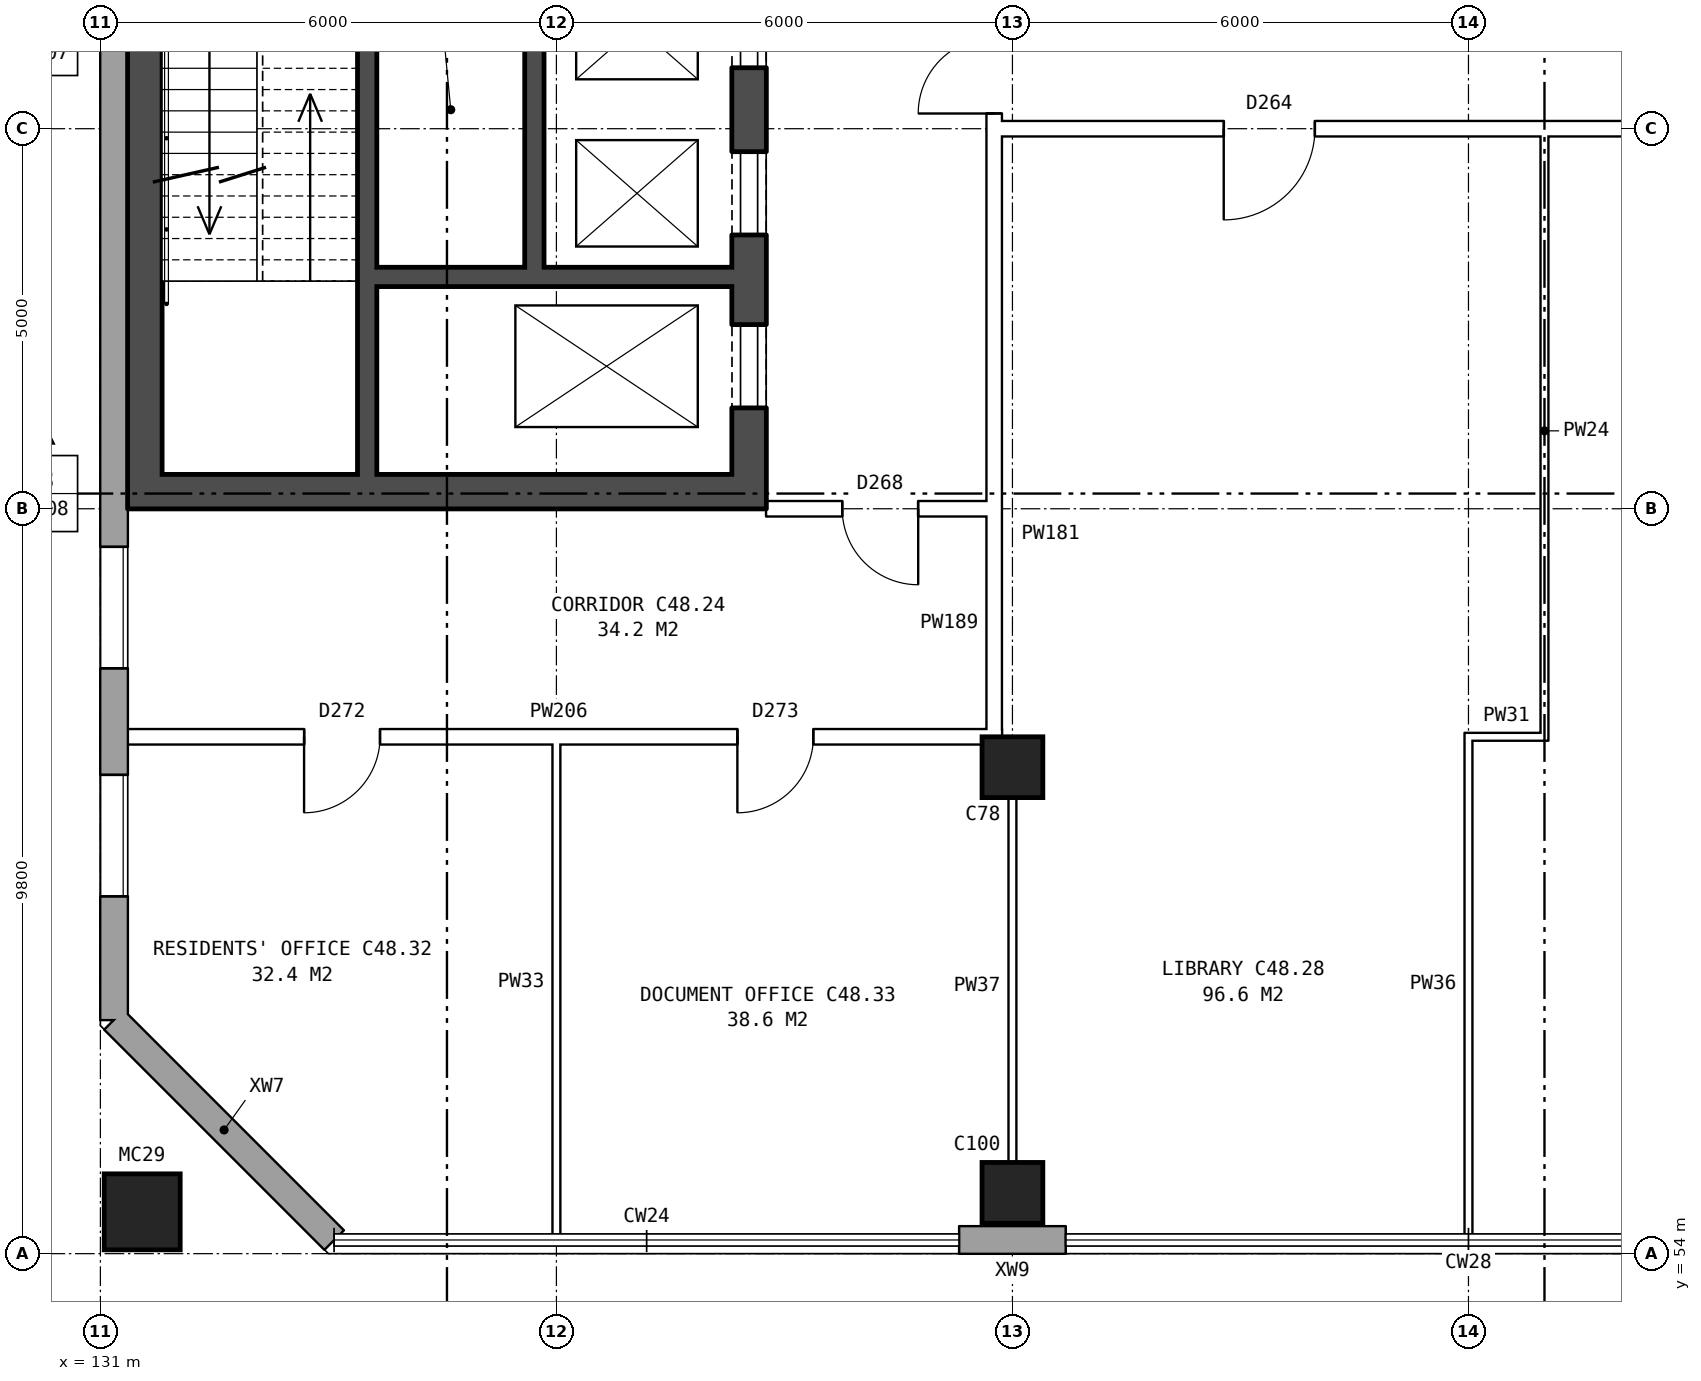
"""IFC4 building model, lengths in metres.
Left out: names, types, materials, properties, quantities, classifications, styles, units other than length and angle.
Written with IfcOpenShell. Run it as: python <this file> out.ifc"""

import sys

from ifc_helpers import new_model, si_unit, direction, frame, frame_2d, origin, origin_2d, place, context, subcontext, project, spatial, rectangle, hollow_rectangle, extrude, element, fill, save


model = new_model("IFC4")
c1 = context("Model", 3, precision=1e-05, world=origin(), true_north=direction((0.0, 1.0)))
c2 = subcontext(c1, "Body", "Model", "MODEL_VIEW")
j1 = project(units=[si_unit("LENGTHUNIT", "METRE"), si_unit("PLANEANGLEUNIT", "RADIAN")], contexts=[c1])
p1 = place(None, origin())
s1 = spatial("IfcSite", under=j1, at=p1, CompositionType="ELEMENT")
p2 = place(p1, origin())
s2 = spatial("IfcBuilding", under=s1, at=p2, CompositionType="ELEMENT")
p3 = place(p2, frame((0.0, 0.0, 171.6)))
s3 = spatial("IfcBuildingStorey", under=s2, at=p3, CompositionType="ELEMENT", Elevation=171.6)
for number, where, z_axis, x_axis in (
    (1, (143.0, 54.8, 0.0), (0.0, 0.0, 1.0), (1.0, 0.0, 0.0)),
    (2, (143.0, 60.4, 0.0), (0.0, 0.0, 1.0), (1.0, 0.0, 0.0)),
):
    element("IfcColumn", number, at=place(p3, frame(where, z_axis=z_axis, x_axis=x_axis)), inside=s3, PredefinedType="COLUMN", context=c2, shape_type="SweptSolid", body=[
        extrude(rectangle(XDim=0.8, YDim=0.8, at=origin_2d()), origin(), (0.0, 0.0, 1.0), 3.6),
    ])
p4 = place(p3, frame((131.55, 54.55, 0.0), z_axis=(0.0, 0.0, 1.0), x_axis=(1.0, 0.0, 0.0)))
e3 = element("IfcColumn", 3, at=p4, inside=s3, PredefinedType="COLUMN", context=c2, shape_type="SweptSolid", body=[
    extrude(hollow_rectangle(XDim=1.0, YDim=1.0, WallThickness=0.055, at=origin_2d()), origin(), (0.0, 0.0, 1.0), 4.2),
])
p5 = place(p3, frame((131.18, 57.075, 0.0), z_axis=(0.0, 0.0, 1.0), x_axis=(0.707106781187, -0.707106781187, 0.0)))
e4 = element("IfcWall", 4, at=p5, inside=s3, PredefinedType="STANDARD", context=c2, shape_type="SweptSolid", body=[
    extrude(rectangle(XDim=4.094, YDim=0.36, at=frame_2d((2.047, 0.0))), origin(), (0.0, 0.0, 1.0), 3.6),
])
p6 = place(p3, frame((142.3, 54.18, 0.0), z_axis=(0.0, 0.0, 1.0), x_axis=(1.0, 0.0, 0.0)))
e5 = element("IfcWall", 5, at=p6, inside=s3, PredefinedType="STANDARD", context=c2, shape_type="SweptSolid", body=[
    extrude(rectangle(XDim=1.4, YDim=0.36, at=frame_2d((0.7, 0.0))), origin(), (0.0, 0.0, 1.0), 3.6),
])
p7 = place(p3, frame((131.18, 82.925, 0.0), z_axis=(0.0, 0.0, 1.0), x_axis=(0.0, -1.0, 0.0)))
e6 = element("IfcWall", 6, at=p7, inside=s3, PredefinedType="STANDARD", context=c2, shape_type="SweptSolid", body=[
    extrude(rectangle(XDim=25.851, YDim=0.36, at=frame_2d((12.925, 0.0))), origin(), (0.0, 0.0, 1.0), 3.6),
])
p8 = place(p7, frame((1.625, 0.0, 0.8)))
e7 = element("IfcOpeningElement", 7, at=p8, cuts=e6, PredefinedType="OPENING", context=c2, shape_type="SweptSolid", body=[
    extrude(rectangle(XDim=1.6, YDim=1.8, at=frame_2d((0.8, 0.9))), frame((0.0, 0.19, 0.0), z_axis=(0.0, -1.0, 0.0), x_axis=(1.0, 0.0, 0.0)), (0.0, 0.0, 1.0), 0.38),
])
p9 = place(p7, frame((4.625, 0.0, 0.8)))
e8 = element("IfcOpeningElement", 8, at=p9, cuts=e6, PredefinedType="OPENING", context=c2, shape_type="SweptSolid", body=[
    extrude(rectangle(XDim=1.6, YDim=1.8, at=frame_2d((0.8, 0.9))), frame((0.0, 0.19, 0.0), z_axis=(0.0, -1.0, 0.0), x_axis=(1.0, 0.0, 0.0)), (0.0, 0.0, 1.0), 0.38),
])
p10 = place(p7, frame((19.625, 0.0, 0.8)))
e9 = element("IfcOpeningElement", 9, at=p10, cuts=e6, PredefinedType="OPENING", context=c2, shape_type="SweptSolid", body=[
    extrude(rectangle(XDim=1.6, YDim=1.8, at=frame_2d((0.8, 0.9))), frame((0.0, 0.19, 0.0), z_axis=(0.0, -1.0, 0.0), x_axis=(1.0, 0.0, 0.0)), (0.0, 0.0, 1.0), 0.38),
])
p11 = place(p7, frame((22.625, 0.0, 0.8)))
e10 = element("IfcOpeningElement", 10, at=p11, cuts=e6, PredefinedType="OPENING", context=c2, shape_type="SweptSolid", body=[
    extrude(rectangle(XDim=1.6, YDim=1.8, at=frame_2d((0.8, 0.9))), frame((0.0, 0.19, 0.0), z_axis=(0.0, -1.0, 0.0), x_axis=(1.0, 0.0, 0.0)), (0.0, 0.0, 1.0), 0.38),
])
p12 = place(p3, frame((139.535, 63.8, 0.0), z_axis=(0.0, 0.0, 1.0), x_axis=(0.0, 1.0, 0.0)))
e11 = element("IfcWall", 11, at=p12, inside=s3, PredefinedType="SHEAR", context=c2, shape_type="SweptSolid", body=[
    extrude(rectangle(XDim=12.4, YDim=0.45, at=frame_2d((6.2, 0.0))), origin(), (0.0, 0.0, 1.0), 3.6),
])
p13 = place(p12, frame((1.325, 0.0, 0.0)))
e12 = element("IfcOpeningElement", 12, at=p13, cuts=e11, PredefinedType="OPENING", context=c2, shape_type="SweptSolid", body=[
    extrude(rectangle(XDim=1.1, YDim=2.1, at=frame_2d((0.55, 1.05))), frame((0.0, 0.235, 0.0), z_axis=(0.0, -1.0, 0.0), x_axis=(1.0, 0.0, 0.0)), (0.0, 0.0, 1.0), 0.47),
])
p14 = place(p12, frame((3.6, 0.0, 0.0)))
e13 = element("IfcOpeningElement", 13, at=p14, cuts=e11, PredefinedType="OPENING", context=c2, shape_type="SweptSolid", body=[
    extrude(rectangle(XDim=1.1, YDim=2.1, at=frame_2d((0.55, 1.05))), frame((0.0, 0.235, 0.0), z_axis=(0.0, -1.0, 0.0), x_axis=(1.0, 0.0, 0.0)), (0.0, 0.0, 1.0), 0.47),
])
p15 = place(p12, frame((5.8, 0.0, 0.0)))
e14 = element("IfcOpeningElement", 14, at=p15, cuts=e11, PredefinedType="OPENING", context=c2, shape_type="SweptSolid", body=[
    extrude(rectangle(XDim=1.1, YDim=2.1, at=frame_2d((0.55, 1.05))), frame((0.0, 0.235, 0.0), z_axis=(0.0, -1.0, 0.0), x_axis=(1.0, 0.0, 0.0)), (0.0, 0.0, 1.0), 0.47),
])
p16 = place(p12, frame((9.9, 0.0, 0.0)))
e15 = element("IfcOpeningElement", 15, at=p16, cuts=e11, PredefinedType="OPENING", context=c2, shape_type="SweptSolid", body=[
    extrude(rectangle(XDim=1.1, YDim=2.1, at=frame_2d((0.55, 1.05))), frame((0.0, 0.235, 0.0), z_axis=(0.0, -1.0, 0.0), x_axis=(1.0, 0.0, 0.0)), (0.0, 0.0, 1.0), 0.47),
])
p17 = place(p12, frame((8.125, 0.0, 0.0)))
e16 = element("IfcOpeningElement", 16, at=p17, cuts=e11, PredefinedType="OPENING", context=c2, shape_type="SweptSolid", body=[
    extrude(rectangle(XDim=0.85, YDim=2.1, at=frame_2d((0.425, 1.05))), frame((0.0, 0.235, 0.0), z_axis=(0.0, -1.0, 0.0), x_axis=(1.0, 0.0, 0.0)), (0.0, 0.0, 1.0), 0.47),
])
p18 = place(p3, frame((131.585, 63.8, 0.0), z_axis=(0.0, 0.0, 1.0), x_axis=(0.0, 1.0, 0.0)))
e17 = element("IfcWall", 17, at=p18, inside=s3, PredefinedType="SHEAR", context=c2, shape_type="SweptSolid", body=[
    extrude(rectangle(XDim=12.4, YDim=0.45, at=frame_2d((6.2, 0.0))), origin(), (0.0, 0.0, 1.0), 3.6),
])
p19 = place(p3, frame((139.31, 64.025, 0.0), z_axis=(0.0, 0.0, 1.0), x_axis=(-1.0, 0.0, 0.0)))
e18 = element("IfcWall", 18, at=p19, inside=s3, PredefinedType="SHEAR", context=c2, shape_type="SweptSolid", body=[
    extrude(rectangle(XDim=7.5, YDim=0.45, at=frame_2d((3.75, 0.0))), origin(), (0.0, 0.0, 1.0), 3.6),
])
p20 = place(p3, frame((139.31, 66.85, 0.0), z_axis=(0.0, 0.0, 1.0), x_axis=(-1.0, 0.0, 0.0)))
e19 = element("IfcWall", 19, at=p20, inside=s3, PredefinedType="SHEAR", context=c2, shape_type="SweptSolid", body=[
    extrude(rectangle(XDim=4.675, YDim=0.25, at=frame_2d((2.337, 0.0))), origin(), (0.0, 0.0, 1.0), 3.6),
])
p21 = place(p3, frame((136.71, 66.975, 0.0), z_axis=(0.0, 0.0, 1.0), x_axis=(0.0, 1.0, 0.0)))
e20 = element("IfcWall", 20, at=p21, inside=s3, PredefinedType="SHEAR", context=c2, shape_type="SweptSolid", body=[
    extrude(rectangle(XDim=4.15, YDim=0.25, at=frame_2d((2.075, 0.0))), origin(), (0.0, 0.0, 1.0), 3.6),
])
p22 = place(p3, frame((134.51, 64.25, 0.0), z_axis=(0.0, 0.0, 1.0), x_axis=(0.0, 1.0, 0.0)))
e21 = element("IfcWall", 21, at=p22, inside=s3, PredefinedType="SHEAR", context=c2, shape_type="SweptSolid", body=[
    extrude(rectangle(XDim=6.875, YDim=0.25, at=frame_2d((3.438, 0.0))), origin(), (0.0, 0.0, 1.0), 3.6),
])
p23 = place(p3, frame((142.76, 63.9, 0.0), z_axis=(0.0, 0.0, 1.0), x_axis=(0.0, 1.0, 0.0)))
e22 = element("IfcWall", 22, at=p23, inside=s3, PredefinedType="PARTITIONING", context=c2, shape_type="SweptSolid", body=[
    extrude(rectangle(XDim=12.2, YDim=0.2, at=frame_2d((6.1, 0.0))), origin(), (0.0, 0.0, 1.0), 3.6),
])
p24 = place(p23, frame((5.1, 0.0, 0.0)))
e23 = element("IfcOpeningElement", 23, at=p24, cuts=e22, PredefinedType="OPENING", context=c2, shape_type="SweptSolid", body=[
    extrude(rectangle(XDim=2.0, YDim=2.1, at=frame_2d((1.0, 1.05))), frame((0.0, 0.11, 0.0), z_axis=(0.0, -1.0, 0.0), x_axis=(1.0, 0.0, 0.0)), (0.0, 0.0, 1.0), 0.22),
])
p25 = place(p3, frame((131.24, 60.8, 0.0), z_axis=(0.0, 0.0, 1.0), x_axis=(1.0, 0.0, 0.0)))
e24 = element("IfcWall", 24, at=p25, inside=s3, PredefinedType="PARTITIONING", context=c2, shape_type="SweptSolid", body=[
    extrude(rectangle(XDim=11.622, YDim=0.2, at=frame_2d((5.811, 0.0))), origin(), (0.0, 0.0, 1.0), 3.6),
])
p26 = place(p25, frame((2.44, 0.0, 0.0)))
e25 = element("IfcOpeningElement", 25, at=p26, cuts=e24, PredefinedType="OPENING", context=c2, shape_type="SweptSolid", body=[
    extrude(rectangle(XDim=1.0, YDim=2.1, at=frame_2d((0.5, 1.05))), frame((0.0, 0.11, 0.0), z_axis=(0.0, -1.0, 0.0), x_axis=(1.0, 0.0, 0.0)), (0.0, 0.0, 1.0), 0.22),
])
p27 = place(p25, frame((8.141, 0.0, 0.0)))
e26 = element("IfcOpeningElement", 26, at=p27, cuts=e24, PredefinedType="OPENING", context=c2, shape_type="SweptSolid", body=[
    extrude(rectangle(XDim=1.0, YDim=2.1, at=frame_2d((0.5, 1.05))), frame((0.0, 0.11, 0.0), z_axis=(0.0, -1.0, 0.0), x_axis=(1.0, 0.0, 0.0)), (0.0, 0.0, 1.0), 0.22),
])
p28 = place(p3, frame((148.95, 60.8, 0.0), z_axis=(0.0, 0.0, 1.0), x_axis=(1.0, 0.0, 0.0)))
e27 = element("IfcWall", 27, at=p28, inside=s3, PredefinedType="PARTITIONING", context=c2, shape_type="SweptSolid", body=[
    extrude(rectangle(XDim=1.1, YDim=0.1, at=frame_2d((0.55, 0.0))), origin(), (0.0, 0.0, 1.0), 3.6),
])
p29 = place(p3, frame((139.76, 63.8, 0.0), z_axis=(0.0, 0.0, 1.0), x_axis=(1.0, 0.0, 0.0)))
e28 = element("IfcWall", 28, at=p29, inside=s3, PredefinedType="PARTITIONING", context=c2, shape_type="SweptSolid", body=[
    extrude(rectangle(XDim=3.1, YDim=0.2, at=frame_2d((1.55, 0.0))), origin(), (0.0, 0.0, 1.0), 3.6),
])
p30 = place(p29, frame((1.0, 0.0, 0.0)))
e29 = element("IfcOpeningElement", 29, at=p30, cuts=e28, PredefinedType="OPENING", context=c2, shape_type="SweptSolid", body=[
    extrude(rectangle(XDim=1.0, YDim=2.1, at=frame_2d((0.5, 1.05))), frame((0.0, 0.11, 0.0), z_axis=(0.0, -1.0, 0.0), x_axis=(1.0, 0.0, 0.0)), (0.0, 0.0, 1.0), 0.22),
])
p31 = place(p3, frame((142.76, 68.8, 0.0), z_axis=(0.0, 0.0, 1.0), x_axis=(1.0, 0.0, 0.0)))
e30 = element("IfcWall", 30, at=p31, inside=s3, PredefinedType="PARTITIONING", context=c2, shape_type="SweptSolid", body=[
    extrude(rectangle(XDim=14.48, YDim=0.2, at=frame_2d((7.24, 0.0))), origin(), (0.0, 0.0, 1.0), 3.6),
])
p32 = place(p31, frame((3.02, 0.0, 0.0)))
e31 = element("IfcOpeningElement", 31, at=p32, cuts=e30, PredefinedType="OPENING", context=c2, shape_type="SweptSolid", body=[
    extrude(rectangle(XDim=1.2, YDim=2.1, at=frame_2d((0.6, 1.05))), frame((0.0, 0.11, 0.0), z_axis=(0.0, -1.0, 0.0), x_axis=(1.0, 0.0, 0.0)), (0.0, 0.0, 1.0), 0.22),
])
p33 = place(p3, frame((137.0, 54.24, 0.0), z_axis=(0.0, 0.0, 1.0), x_axis=(0.0, 1.0, 0.0)))
e32 = element("IfcWall", 32, at=p33, inside=s3, PredefinedType="PARTITIONING", context=c2, shape_type="SweptSolid", body=[
    extrude(rectangle(XDim=6.66, YDim=0.1, at=frame_2d((3.33, 0.0))), origin(), (0.0, 0.0, 1.0), 3.6),
])
p34 = place(p3, frame((142.76, 60.7, 0.0), z_axis=(0.0, 0.0, 1.0), x_axis=(0.0, 1.0, 0.0)))
e33 = element("IfcWall", 33, at=p34, inside=s3, PredefinedType="PARTITIONING", context=c2, shape_type="SweptSolid", body=[
    extrude(rectangle(XDim=3.2, YDim=0.2, at=frame_2d((1.6, 0.0))), origin(), (0.0, 0.0, 1.0), 3.6),
])
p35 = place(p3, frame((143.0, 54.24, 0.0), z_axis=(0.0, 0.0, 1.0), x_axis=(0.0, 1.0, 0.0)))
e34 = element("IfcWall", 34, at=p35, inside=s3, PredefinedType="PARTITIONING", context=c2, shape_type="SweptSolid", body=[
    extrude(rectangle(XDim=6.56, YDim=0.1, at=frame_2d((3.28, 0.0))), origin(), (0.0, 0.0, 1.0), 3.6),
])
p36 = place(p3, frame((149.0, 54.24, 0.0), z_axis=(0.0, 0.0, 1.0), x_axis=(0.0, 1.0, 0.0)))
e35 = element("IfcWall", 35, at=p36, inside=s3, PredefinedType="PARTITIONING", context=c2, shape_type="SweptSolid", body=[
    extrude(rectangle(XDim=6.61, YDim=0.1, at=frame_2d((3.305, 0.0))), origin(), (0.0, 0.0, 1.0), 3.6),
])
p37 = place(p3, frame((150.0, 60.75, 0.0), z_axis=(0.0, 0.0, 1.0), x_axis=(0.0, 1.0, 0.0)))
e36 = element("IfcWall", 36, at=p37, inside=s3, PredefinedType="PARTITIONING", context=c2, shape_type="SweptSolid", body=[
    extrude(rectangle(XDim=8.15, YDim=0.1, at=frame_2d((4.075, 0.0))), origin(), (0.0, 0.0, 1.0), 3.6),
])
p38 = place(p10, origin())
e37 = element("IfcWindow", 37, at=p38, inside=s3, PartitioningType="SINGLE_PANEL", PredefinedType="WINDOW", context=c2, shape_type="SweptSolid", body=[
    extrude(rectangle(XDim=1.6, YDim=1.8, at=frame_2d((0.8, 0.9))), frame((0.0, 0.15, 0.0), z_axis=(0.0, -1.0, 0.0), x_axis=(1.0, 0.0, 0.0)), (0.0, 0.0, 1.0), 0.06),
])
fill(e9, e37)
p39 = place(p11, origin())
e38 = element("IfcWindow", 38, at=p39, inside=s3, PartitioningType="SINGLE_PANEL", PredefinedType="WINDOW", context=c2, shape_type="SweptSolid", body=[
    extrude(rectangle(XDim=1.6, YDim=1.8, at=frame_2d((0.8, 0.9))), frame((0.0, 0.15, 0.0), z_axis=(0.0, -1.0, 0.0), x_axis=(1.0, 0.0, 0.0)), (0.0, 0.0, 1.0), 0.06),
])
fill(e10, e38)
p40 = place(p13, origin())
e39 = element("IfcDoor", 39, at=p40, inside=s3, OperationType="DOUBLE_DOOR_SLIDING", PredefinedType="DOOR", context=c2, shape_type="SweptSolid", body=[
    extrude(rectangle(XDim=1.1, YDim=2.1, at=frame_2d((0.55, 1.05))), frame((0.0, 0.21, 0.0), z_axis=(0.0, -1.0, 0.0), x_axis=(1.0, 0.0, 0.0)), (0.0, 0.0, 1.0), 0.05),
])
fill(e12, e39)
p41 = place(p14, origin())
e40 = element("IfcDoor", 40, at=p41, inside=s3, OperationType="DOUBLE_DOOR_SLIDING", PredefinedType="DOOR", context=c2, shape_type="SweptSolid", body=[
    extrude(rectangle(XDim=1.1, YDim=2.1, at=frame_2d((0.55, 1.05))), frame((0.0, 0.21, 0.0), z_axis=(0.0, -1.0, 0.0), x_axis=(1.0, 0.0, 0.0)), (0.0, 0.0, 1.0), 0.05),
])
fill(e13, e40)
p42 = place(p15, origin())
e41 = element("IfcDoor", 41, at=p42, inside=s3, OperationType="DOUBLE_DOOR_SLIDING", PredefinedType="DOOR", context=c2, shape_type="SweptSolid", body=[
    extrude(rectangle(XDim=1.1, YDim=2.1, at=frame_2d((0.55, 1.05))), frame((0.0, 0.21, 0.0), z_axis=(0.0, -1.0, 0.0), x_axis=(1.0, 0.0, 0.0)), (0.0, 0.0, 1.0), 0.05),
])
fill(e14, e41)
p43 = place(p24, origin())
e42 = element("IfcDoor", 42, at=p43, inside=s3, OperationType="DOUBLE_DOOR_SINGLE_SWING", PredefinedType="DOOR", context=c2, shape_type="SweptSolid", body=[
    extrude(rectangle(XDim=2.0, YDim=2.1, at=frame_2d((1.0, 1.05))), frame((0.0, 0.025, 0.0), z_axis=(0.0, -1.0, 0.0), x_axis=(1.0, 0.0, 0.0)), (0.0, 0.0, 1.0), 0.05),
])
fill(e23, e42)
p44 = place(p26, frame((1.0, 0.0, 0.0), z_axis=(0.0, 0.0, 1.0), x_axis=(-1.0, 0.0, 0.0)))
e43 = element("IfcDoor", 43, at=p44, inside=s3, OperationType="SINGLE_SWING_RIGHT", PredefinedType="DOOR", context=c2, shape_type="SweptSolid", body=[
    extrude(rectangle(XDim=1.0, YDim=2.1, at=frame_2d((0.5, 1.05))), frame((0.0, 0.025, 0.0), z_axis=(0.0, -1.0, 0.0), x_axis=(1.0, 0.0, 0.0)), (0.0, 0.0, 1.0), 0.05),
])
fill(e25, e43)
p45 = place(p27, frame((1.0, 0.0, 0.0), z_axis=(0.0, 0.0, 1.0), x_axis=(-1.0, 0.0, 0.0)))
e44 = element("IfcDoor", 44, at=p45, inside=s3, OperationType="SINGLE_SWING_RIGHT", PredefinedType="DOOR", context=c2, shape_type="SweptSolid", body=[
    extrude(rectangle(XDim=1.0, YDim=2.1, at=frame_2d((0.5, 1.05))), frame((0.0, 0.025, 0.0), z_axis=(0.0, -1.0, 0.0), x_axis=(1.0, 0.0, 0.0)), (0.0, 0.0, 1.0), 0.05),
])
fill(e26, e44)
p46 = place(p30, frame((1.0, 0.0, 0.0), z_axis=(0.0, 0.0, 1.0), x_axis=(-1.0, 0.0, 0.0)))
e45 = element("IfcDoor", 45, at=p46, inside=s3, OperationType="SINGLE_SWING_LEFT", PredefinedType="DOOR", context=c2, shape_type="SweptSolid", body=[
    extrude(rectangle(XDim=1.0, YDim=2.1, at=frame_2d((0.5, 1.05))), frame((0.0, 0.025, 0.0), z_axis=(0.0, -1.0, 0.0), x_axis=(1.0, 0.0, 0.0)), (0.0, 0.0, 1.0), 0.05),
])
fill(e29, e45)
p47 = place(p32, frame((1.2, 0.0, 0.0), z_axis=(0.0, 0.0, 1.0), x_axis=(-1.0, 0.0, 0.0)))
e46 = element("IfcDoor", 46, at=p47, inside=s3, OperationType="SINGLE_SWING_RIGHT", PredefinedType="DOOR", context=c2, shape_type="SweptSolid", body=[
    extrude(rectangle(XDim=1.2, YDim=2.1, at=frame_2d((0.6, 1.05))), frame((0.0, 0.025, 0.0), z_axis=(0.0, -1.0, 0.0), x_axis=(1.0, 0.0, 0.0)), (0.0, 0.0, 1.0), 0.05),
])
fill(e31, e46)
save(model, sys.argv[1])
